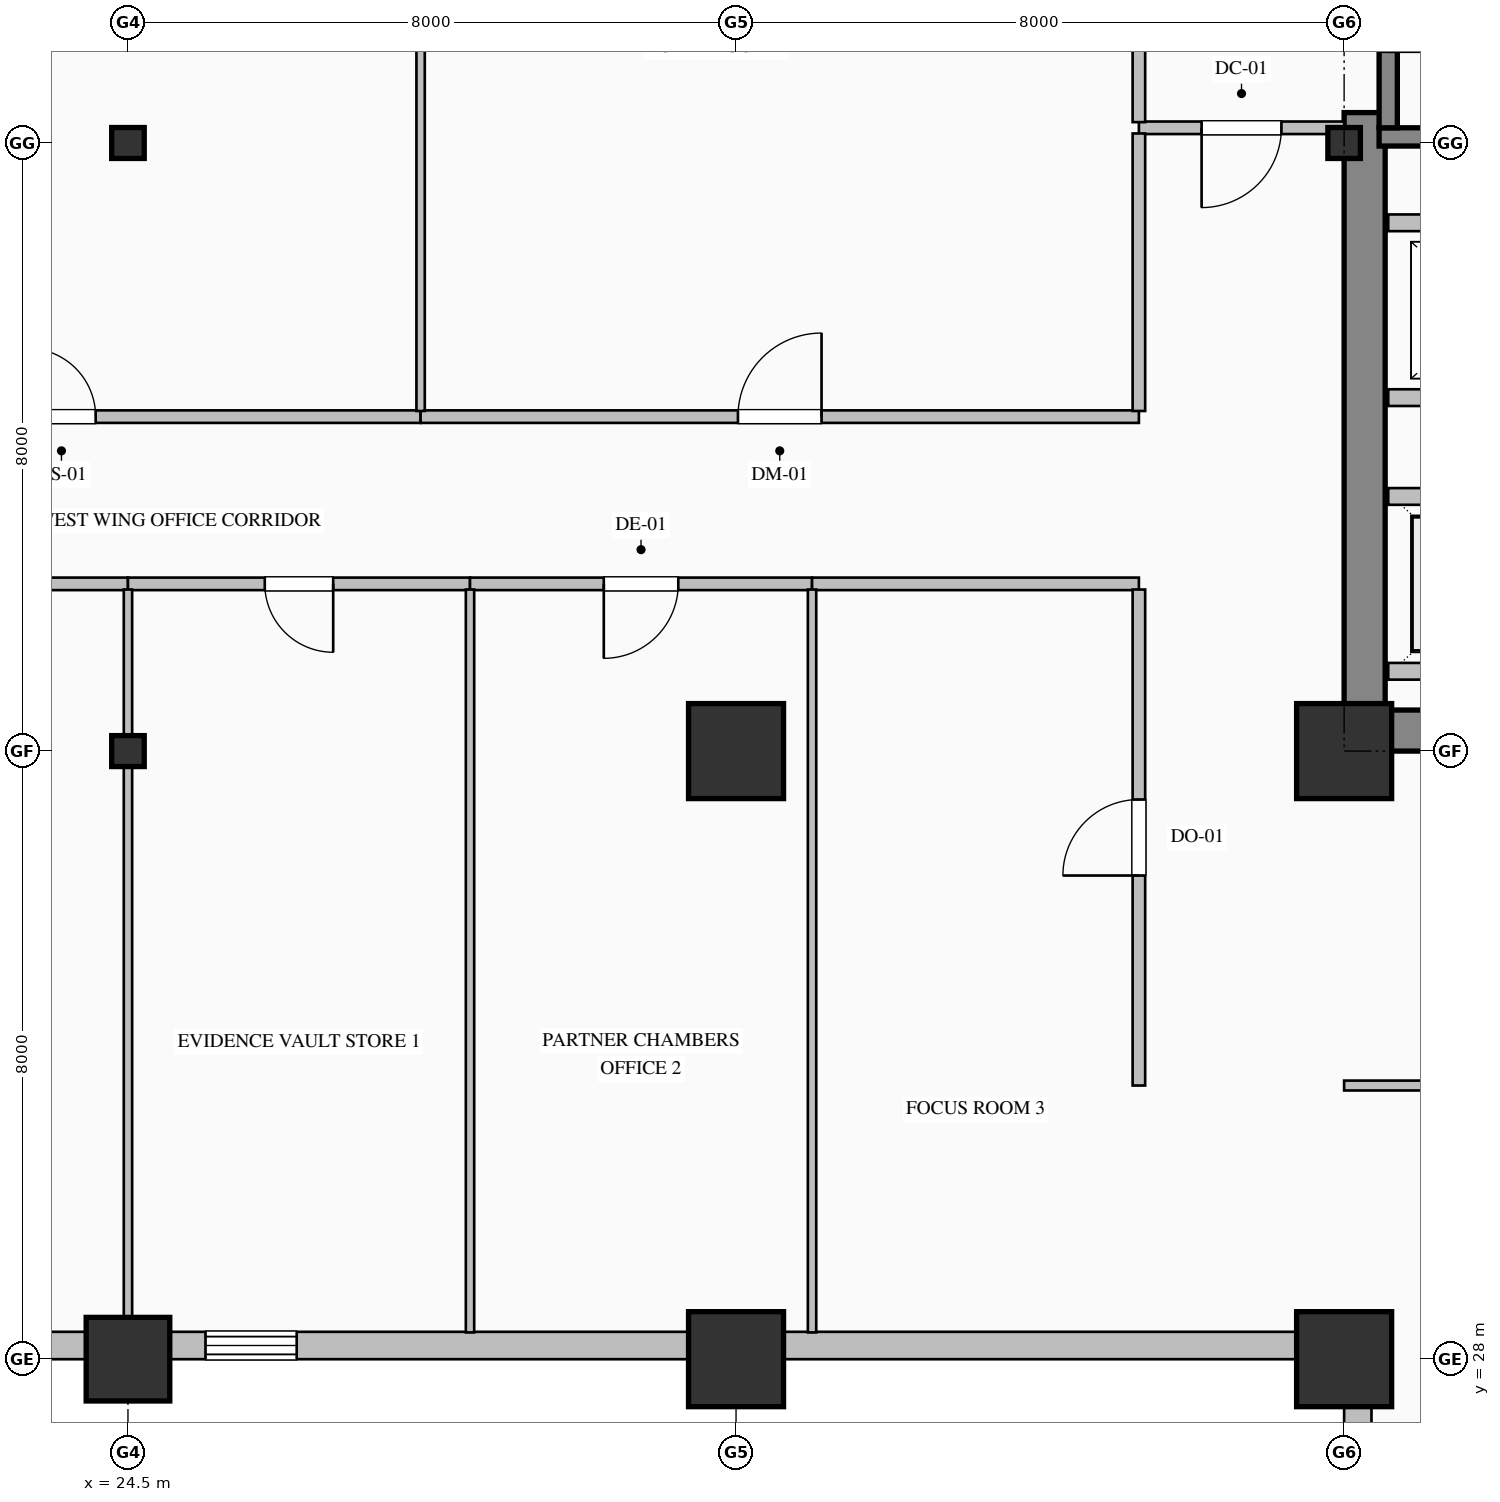
"""IFC4 building model, lengths in metres.
Left out: names, types, materials, properties, quantities, classifications, styles, units other than length and angle.
Written with IfcOpenShell. Run it as: python <this file> out.ifc"""

import sys

from ifc_helpers import new_model, si_unit, direction, frame, frame_2d, origin, origin_2d, place, context, subcontext, project, spatial, rectangle, hollow_rectangle, i_section, extrude, element, fill, save


model = new_model("IFC4")
c1 = context("Model", 3, precision=1e-05, world=origin(), true_north=direction((0.0, 1.0)))
c2 = subcontext(c1, "Body", "Model", "MODEL_VIEW")
j1 = project(units=[si_unit("LENGTHUNIT", "METRE"), si_unit("PLANEANGLEUNIT", "RADIAN")], contexts=[c1])
p1 = place(None, origin())
s1 = spatial("IfcSite", under=j1, at=p1, CompositionType="ELEMENT")
p2 = place(p1, origin())
s2 = spatial("IfcBuilding", under=s1, at=p2, CompositionType="ELEMENT")
p3 = place(p2, frame((0.0, 0.0, 104.2)))
s3 = spatial("IfcBuildingStorey", under=s2, at=p3, CompositionType="ELEMENT", Elevation=104.2)
p4 = place(p3, frame((40.77, 36.54, 0.0), z_axis=(0.0, 0.0, 1.0), x_axis=(0.0, 1.0, 0.0)))
e1 = element("IfcWall", 1, at=p4, inside=s3, PredefinedType="SHEAR", context=c2, shape_type="SweptSolid", body=[
    extrude(rectangle(XDim=7.86, YDim=0.54, at=frame_2d((3.93, 0.0))), origin(), (0.0, 0.0, 1.0), 3.65),
])
p5 = place(p3, frame((40.5, 36.27, 0.0), z_axis=(0.0, 0.0, 1.0), x_axis=(1.0, 0.0, 0.0)))
e2 = element("IfcWall", 2, at=p5, inside=s3, PredefinedType="SHEAR", context=c2, shape_type="SweptSolid", body=[
    extrude(rectangle(XDim=1.7, YDim=0.54, at=frame_2d((0.85, 0.0))), origin(), (0.0, 0.0, 1.0), 3.65),
])
p6 = place(p3, frame((24.5, 28.0, 0.0), z_axis=(0.0, 0.0, 1.0), x_axis=(1.0, 0.0, 0.0)))
e3 = element("IfcColumn", 3, at=p6, inside=s3, PredefinedType="COLUMN", context=c2, shape_type="SweptSolid", body=[
    extrude(hollow_rectangle(XDim=1.1, YDim=1.1, WallThickness=0.04, at=origin_2d()), origin(), (0.0, 0.0, 1.0), 4.0),
])
for number, where, z_axis, x_axis in (
    (4, (24.5, 36.0, 0.0), (0.0, 0.0, 1.0), (1.0, 0.0, 0.0)),
    (5, (24.5, 44.0, 0.0), (0.0, 0.0, 1.0), (1.0, 0.0, 0.0)),
):
    element("IfcColumn", number, at=place(p3, frame(where, z_axis=z_axis, x_axis=x_axis)), inside=s3, PredefinedType="COLUMN", context=c2, shape_type="SweptSolid", body=[
        extrude(i_section(OverallWidth=0.407, OverallDepth=0.428, WebThickness=0.02, FlangeThickness=0.035, FilletRadius=0.022, at=origin_2d()), origin(), (0.0, 0.0, 1.0), 4.0),
    ])
for number, where, z_axis, x_axis in (
    (6, (32.5, 28.0, 0.0), (0.0, 0.0, 1.0), (1.0, 0.0, 0.0)),
    (7, (32.5, 36.0, 0.0), (0.0, 0.0, 1.0), (1.0, 0.0, 0.0)),
    (8, (40.5, 28.0, 0.0), (0.0, 0.0, 1.0), (1.0, 0.0, 0.0)),
    (9, (40.5, 36.0, 0.0), (0.0, 0.0, 1.0), (1.0, 0.0, 0.0)),
):
    element("IfcColumn", number, at=place(p3, frame(where, z_axis=z_axis, x_axis=x_axis)), inside=s3, PredefinedType="COLUMN", context=c2, shape_type="SweptSolid", body=[
        extrude(hollow_rectangle(XDim=1.25, YDim=1.25, WallThickness=0.045, at=origin_2d()), origin(), (0.0, 0.0, 1.0), 4.0),
    ])
p7 = place(p3, frame((40.5, 44.0, 0.0), z_axis=(0.0, 0.0, 1.0), x_axis=(1.0, 0.0, 0.0)))
e10 = element("IfcColumn", 10, at=p7, inside=s3, PredefinedType="COLUMN", context=c2, shape_type="SweptSolid", body=[
    extrude(i_section(OverallWidth=0.407, OverallDepth=0.428, WebThickness=0.02, FlangeThickness=0.035, FilletRadius=0.022, at=origin_2d()), origin(), (0.0, 0.0, 1.0), 4.0),
])
p8 = place(p3, frame((40.68, 8.0, 0.0), z_axis=(0.0, 0.0, 1.0), x_axis=(0.0, 1.0, 0.0)))
e11 = element("IfcWall", 11, at=p8, inside=s3, PredefinedType="SOLIDWALL", context=c2, shape_type="SweptSolid", body=[
    extrude(rectangle(XDim=20.36, YDim=0.36, at=frame_2d((10.18, 0.0))), origin(), (0.0, 0.0, 1.0), 2.95),
])
p9 = place(p8, frame((6.6, 0.0, 0.7)))
e12 = element("IfcOpeningElement", 12, at=p9, cuts=e11, PredefinedType="OPENING", context=c2, shape_type="SweptSolid", body=[
    extrude(rectangle(XDim=1.2, YDim=1.85, at=frame_2d((0.6, 0.925))), frame((0.0, 0.19, 0.0), z_axis=(0.0, -1.0, 0.0), x_axis=(1.0, 0.0, 0.0)), (0.0, 0.0, 1.0), 0.38),
])
p10 = place(p8, frame((13.8, 0.0, 0.7)))
e13 = element("IfcOpeningElement", 13, at=p10, cuts=e11, PredefinedType="OPENING", context=c2, shape_type="SweptSolid", body=[
    extrude(rectangle(XDim=1.2, YDim=1.85, at=frame_2d((0.6, 0.925))), frame((0.0, 0.19, 0.0), z_axis=(0.0, -1.0, 0.0), x_axis=(1.0, 0.0, 0.0)), (0.0, 0.0, 1.0), 0.38),
])
p11 = place(p3, frame((40.52, 28.18, 0.0), z_axis=(0.0, 0.0, 1.0), x_axis=(-1.0, 0.0, 0.0)))
e14 = element("IfcWall", 14, at=p11, inside=s3, PredefinedType="SOLIDWALL", context=c2, shape_type="SweptSolid", body=[
    extrude(rectangle(XDim=36.52, YDim=0.36, at=frame_2d((18.26, 0.0))), origin(), (0.0, 0.0, 1.0), 2.95),
])
p12 = place(p11, frame((13.8, 0.0, 0.7)))
e15 = element("IfcOpeningElement", 15, at=p12, cuts=e14, PredefinedType="OPENING", context=c2, shape_type="SweptSolid", body=[
    extrude(rectangle(XDim=1.2, YDim=1.85, at=frame_2d((0.6, 0.925))), frame((0.0, 0.19, 0.0), z_axis=(0.0, -1.0, 0.0), x_axis=(1.0, 0.0, 0.0)), (0.0, 0.0, 1.0), 0.38),
])
p13 = place(p11, frame((17.4, 0.0, 0.7)))
e16 = element("IfcOpeningElement", 16, at=p13, cuts=e14, PredefinedType="OPENING", context=c2, shape_type="SweptSolid", body=[
    extrude(rectangle(XDim=1.2, YDim=1.85, at=frame_2d((0.6, 0.925))), frame((0.0, 0.19, 0.0), z_axis=(0.0, -1.0, 0.0), x_axis=(1.0, 0.0, 0.0)), (0.0, 0.0, 1.0), 0.38),
])
p14 = place(p11, frame((21.0, 0.0, 0.7)))
e17 = element("IfcOpeningElement", 17, at=p14, cuts=e14, PredefinedType="OPENING", context=c2, shape_type="SweptSolid", body=[
    extrude(rectangle(XDim=1.2, YDim=1.85, at=frame_2d((0.6, 0.925))), frame((0.0, 0.19, 0.0), z_axis=(0.0, -1.0, 0.0), x_axis=(1.0, 0.0, 0.0)), (0.0, 0.0, 1.0), 0.38),
])
p15 = place(p11, frame((28.2, 0.0, 0.7)))
e18 = element("IfcOpeningElement", 18, at=p15, cuts=e14, PredefinedType="OPENING", context=c2, shape_type="SweptSolid", body=[
    extrude(rectangle(XDim=1.2, YDim=1.85, at=frame_2d((0.6, 0.925))), frame((0.0, 0.19, 0.0), z_axis=(0.0, -1.0, 0.0), x_axis=(1.0, 0.0, 0.0)), (0.0, 0.0, 1.0), 0.38),
])
p16 = place(p3, frame((49.04, 44.08, 0.0), z_axis=(0.0, 0.0, 1.0), x_axis=(-1.0, 0.0, 0.0)))
e19 = element("IfcWall", 19, at=p16, inside=s3, PredefinedType="SOLIDWALL", context=c2, shape_type="SweptSolid", body=[
    extrude(rectangle(XDim=8.08, YDim=0.24, at=frame_2d((4.04, 0.0))), origin(), (0.0, 0.0, 1.0), 4.0),
])
p17 = place(p3, frame((41.08, 47.35, 0.0), z_axis=(0.0, 0.0, 1.0), x_axis=(0.0, -1.0, 0.0)))
e20 = element("IfcWall", 20, at=p17, inside=s3, PredefinedType="SOLIDWALL", context=c2, shape_type="SweptSolid", body=[
    extrude(rectangle(XDim=3.15, YDim=0.24, at=frame_2d((1.575, 0.0))), origin(), (0.0, 0.0, 1.0), 4.0),
])
p18 = place(p17, frame((1.0, 0.0, 0.0)))
e21 = element("IfcOpeningElement", 21, at=p18, cuts=e20, PredefinedType="OPENING", context=c2, shape_type="SweptSolid", body=[
    extrude(rectangle(XDim=1.15, YDim=2.2, at=frame_2d((0.575, 1.1))), frame((0.0, 0.13, 0.0), z_axis=(0.0, -1.0, 0.0), x_axis=(1.0, 0.0, 0.0)), (0.0, 0.0, 1.0), 0.26),
])
p19 = place(p3, frame((49.32, 37.05, 0.0), z_axis=(0.0, 0.0, 1.0), x_axis=(-1.0, 0.0, 0.0)))
e22 = element("IfcWall", 22, at=p19, inside=s3, PredefinedType="PARTITIONING", context=c2, shape_type="SweptSolid", body=[
    extrude(rectangle(XDim=8.24, YDim=0.22, at=frame_2d((4.12, 0.0))), origin(), (0.0, 0.0, 1.0), 3.65),
])
p20 = place(p19, frame((6.37, 0.0, 0.0)))
e23 = element("IfcOpeningElement", 23, at=p20, cuts=e22, PredefinedType="OPENING", context=c2, shape_type="SweptSolid", body=[
    extrude(rectangle(XDim=1.1, YDim=2.2, at=frame_2d((0.55, 1.1))), frame((0.0, 0.12, 0.0), z_axis=(0.0, -1.0, 0.0), x_axis=(1.0, 0.0, 0.0)), (0.0, 0.0, 1.0), 0.24),
])
p21 = place(p19, frame((3.57, 0.0, 0.0)))
e24 = element("IfcOpeningElement", 24, at=p21, cuts=e22, PredefinedType="OPENING", context=c2, shape_type="SweptSolid", body=[
    extrude(rectangle(XDim=1.1, YDim=2.2, at=frame_2d((0.55, 1.1))), frame((0.0, 0.12, 0.0), z_axis=(0.0, -1.0, 0.0), x_axis=(1.0, 0.0, 0.0)), (0.0, 0.0, 1.0), 0.24),
])
p22 = place(p19, frame((0.77, 0.0, 0.0)))
e25 = element("IfcOpeningElement", 25, at=p22, cuts=e22, PredefinedType="OPENING", context=c2, shape_type="SweptSolid", body=[
    extrude(rectangle(XDim=1.1, YDim=2.2, at=frame_2d((0.55, 1.1))), frame((0.0, 0.12, 0.0), z_axis=(0.0, -1.0, 0.0), x_axis=(1.0, 0.0, 0.0)), (0.0, 0.0, 1.0), 0.24),
])
for number, where, z_axis, x_axis in (
    (26, (41.08, 39.35, 0.0), (0.0, 0.0, 1.0), (1.0, 0.0, 0.0)),
    (27, (49.32, 40.65, 0.0), (0.0, 0.0, 1.0), (-1.0, 0.0, 0.0)),
    (28, (41.08, 42.95, 0.0), (0.0, 0.0, 1.0), (1.0, 0.0, 0.0)),
):
    element("IfcWall", number, at=place(p3, frame(where, z_axis=z_axis, x_axis=x_axis)), inside=s3, PredefinedType="PARTITIONING", context=c2, shape_type="SweptSolid", body=[
        extrude(rectangle(XDim=8.24, YDim=0.22, at=frame_2d((4.12, 0.0))), origin(), (0.0, 0.0, 1.0), 3.65),
    ])
p23 = place(p3, frame((40.5, 44.2, 0.0), z_axis=(0.0, 0.0, 1.0), x_axis=(-1.0, 0.0, 0.0)))
e29 = element("IfcWall", 29, at=p23, inside=s3, PredefinedType="PARTITIONING", context=c2, shape_type="SweptSolid", body=[
    extrude(rectangle(XDim=2.7, YDim=0.165, at=frame_2d((1.35, 0.0))), origin(), (0.0, 0.0, 1.0), 3.65),
])
p24 = place(p23, frame((0.825, 0.0, 0.0)))
e30 = element("IfcOpeningElement", 30, at=p24, cuts=e29, PredefinedType="OPENING", context=c2, shape_type="SweptSolid", body=[
    extrude(rectangle(XDim=1.05, YDim=2.15, at=frame_2d((0.525, 1.075))), frame((0.0, 0.093, 0.0), z_axis=(0.0, -1.0, 0.0), x_axis=(1.0, 0.0, 0.0)), (0.0, 0.0, 1.0), 0.185),
])
p25 = place(p3, frame((37.8, 44.274, 0.0), z_axis=(0.0, 0.0, 1.0), x_axis=(0.0, 1.0, 0.0)))
e31 = element("IfcWall", 31, at=p25, inside=s3, PredefinedType="PARTITIONING", context=c2, shape_type="SweptSolid", body=[
    extrude(rectangle(XDim=3.051, YDim=0.165, at=frame_2d((1.525, 0.0))), origin(), (0.0, 0.0, 1.0), 3.65),
])
p26 = place(p3, frame((18.9, 40.4, 0.0), z_axis=(0.0, 0.0, 1.0), x_axis=(1.0, 0.0, 0.0)))
e32 = element("IfcWall", 32, at=p26, inside=s3, PredefinedType="PARTITIONING", context=c2, shape_type="SweptSolid", body=[
    extrude(rectangle(XDim=9.45, YDim=0.165, at=frame_2d((4.725, 0.0))), origin(), (0.0, 0.0, 1.0), 3.65),
])
p27 = place(p26, frame((4.275, 0.0, 0.0)))
e33 = element("IfcOpeningElement", 33, at=p27, cuts=e32, PredefinedType="OPENING", context=c2, shape_type="SweptSolid", body=[
    extrude(rectangle(XDim=0.9, YDim=2.15, at=frame_2d((0.45, 1.075))), frame((0.0, 0.093, 0.0), z_axis=(0.0, -1.0, 0.0), x_axis=(1.0, 0.0, 0.0)), (0.0, 0.0, 1.0), 0.185),
])
p28 = place(p3, frame((28.35, 40.4, 0.0), z_axis=(0.0, 0.0, 1.0), x_axis=(1.0, 0.0, 0.0)))
e34 = element("IfcWall", 34, at=p28, inside=s3, PredefinedType="PARTITIONING", context=c2, shape_type="SweptSolid", body=[
    extrude(rectangle(XDim=9.45, YDim=0.165, at=frame_2d((4.725, 0.0))), origin(), (0.0, 0.0, 1.0), 3.65),
])
p29 = place(p28, frame((4.175, 0.0, 0.0)))
e35 = element("IfcOpeningElement", 35, at=p29, cuts=e34, PredefinedType="OPENING", context=c2, shape_type="SweptSolid", body=[
    extrude(rectangle(XDim=1.1, YDim=2.2, at=frame_2d((0.55, 1.1))), frame((0.0, 0.093, 0.0), z_axis=(0.0, -1.0, 0.0), x_axis=(1.0, 0.0, 0.0)), (0.0, 0.0, 1.0), 0.185),
])
p30 = place(p3, frame((24.5, 38.2, 0.0), z_axis=(0.0, 0.0, 1.0), x_axis=(-1.0, 0.0, 0.0)))
e36 = element("IfcWall", 36, at=p30, inside=s3, PredefinedType="PARTITIONING", context=c2, shape_type="SweptSolid", body=[
    extrude(rectangle(XDim=15.5, YDim=0.165, at=frame_2d((7.75, 0.0))), origin(), (0.0, 0.0, 1.0), 3.65),
])
p31 = place(p30, frame((6.75, 0.0, 0.0)))
e37 = element("IfcOpeningElement", 37, at=p31, cuts=e36, PredefinedType="OPENING", context=c2, shape_type="SweptSolid", body=[
    extrude(rectangle(XDim=2.0, YDim=2.4, at=frame_2d((1.0, 1.2))), frame((0.0, 0.093, 0.0), z_axis=(0.0, -1.0, 0.0), x_axis=(1.0, 0.0, 0.0)), (0.0, 0.0, 1.0), 0.185),
])
p32 = place(p3, frame((29.0, 38.2, 0.0), z_axis=(0.0, 0.0, 1.0), x_axis=(-1.0, 0.0, 0.0)))
e38 = element("IfcWall", 38, at=p32, inside=s3, PredefinedType="PARTITIONING", context=c2, shape_type="SweptSolid", body=[
    extrude(rectangle(XDim=4.5, YDim=0.165, at=frame_2d((2.25, 0.0))), origin(), (0.0, 0.0, 1.0), 3.65),
])
p33 = place(p32, frame((1.8, 0.0, 0.0)))
e39 = element("IfcOpeningElement", 39, at=p33, cuts=e38, PredefinedType="OPENING", context=c2, shape_type="SweptSolid", body=[
    extrude(rectangle(XDim=0.9, YDim=2.15, at=frame_2d((0.45, 1.075))), frame((0.0, 0.093, 0.0), z_axis=(0.0, -1.0, 0.0), x_axis=(1.0, 0.0, 0.0)), (0.0, 0.0, 1.0), 0.185),
])
p34 = place(p3, frame((33.5, 38.2, 0.0), z_axis=(0.0, 0.0, 1.0), x_axis=(-1.0, 0.0, 0.0)))
e40 = element("IfcWall", 40, at=p34, inside=s3, PredefinedType="PARTITIONING", context=c2, shape_type="SweptSolid", body=[
    extrude(rectangle(XDim=4.5, YDim=0.165, at=frame_2d((2.25, 0.0))), origin(), (0.0, 0.0, 1.0), 3.65),
])
p35 = place(p34, frame((1.76, 0.0, 0.0)))
e41 = element("IfcOpeningElement", 41, at=p35, cuts=e40, PredefinedType="OPENING", context=c2, shape_type="SweptSolid", body=[
    extrude(rectangle(XDim=0.98, YDim=2.25, at=frame_2d((0.49, 1.125))), frame((0.0, 0.093, 0.0), z_axis=(0.0, -1.0, 0.0), x_axis=(1.0, 0.0, 0.0)), (0.0, 0.0, 1.0), 0.185),
])
p36 = place(p3, frame((37.8, 38.2, 0.0), z_axis=(0.0, 0.0, 1.0), x_axis=(-1.0, 0.0, 0.0)))
e42 = element("IfcWall", 42, at=p36, inside=s3, PredefinedType="PARTITIONING", context=c2, shape_type="SweptSolid", body=[
    extrude(rectangle(XDim=4.3, YDim=0.165, at=frame_2d((2.15, 0.0))), origin(), (0.0, 0.0, 1.0), 3.65),
])
p37 = place(p3, frame((37.8, 40.475, 0.0), z_axis=(0.0, 0.0, 1.0), x_axis=(0.0, 1.0, 0.0)))
e43 = element("IfcWall", 43, at=p37, inside=s3, PredefinedType="PARTITIONING", context=c2, shape_type="SweptSolid", body=[
    extrude(rectangle(XDim=3.651, YDim=0.165, at=frame_2d((1.825, 0.0))), origin(), (0.0, 0.0, 1.0), 3.65),
])
p38 = place(p3, frame((37.8, 31.6, 0.0), z_axis=(0.0, 0.0, 1.0), x_axis=(0.0, 1.0, 0.0)))
e44 = element("IfcWall", 44, at=p38, inside=s3, PredefinedType="PARTITIONING", context=c2, shape_type="SweptSolid", body=[
    extrude(rectangle(XDim=6.525, YDim=0.165, at=frame_2d((3.263, 0.0))), origin(), (0.0, 0.0, 1.0), 3.65),
])
p39 = place(p38, frame((2.763, 0.0, 0.0)))
e45 = element("IfcOpeningElement", 45, at=p39, cuts=e44, PredefinedType="OPENING", context=c2, shape_type="SweptSolid", body=[
    extrude(rectangle(XDim=1.0, YDim=2.15, at=frame_2d((0.5, 1.075))), frame((0.0, 0.093, 0.0), z_axis=(0.0, -1.0, 0.0), x_axis=(1.0, 0.0, 0.0)), (0.0, 0.0, 1.0), 0.185),
])
p40 = place(p3, frame((43.0, 31.6, 0.0), z_axis=(0.0, 0.0, 1.0), x_axis=(-1.0, 0.0, 0.0)))
e46 = element("IfcWall", 46, at=p40, inside=s3, PredefinedType="PARTITIONING", context=c2, shape_type="SweptSolid", body=[
    extrude(rectangle(XDim=2.5, YDim=0.13, at=frame_2d((1.25, 0.0))), origin(), (0.0, 0.0, 1.0), 3.65),
])
p41 = place(p3, frame((28.35, 51.648, 0.0), z_axis=(0.0, 0.0, 1.0), x_axis=(0.0, -1.0, 0.0)))
e47 = element("IfcWall", 47, at=p41, inside=s3, PredefinedType="MOVABLE", context=c2, shape_type="SweptSolid", body=[
    extrude(rectangle(XDim=11.173, YDim=0.11, at=frame_2d((5.587, 0.0))), origin(), (0.0, 0.0, 1.0), 3.65),
])
p42 = place(p3, frame((24.5, 38.125, 0.0), z_axis=(0.0, 0.0, 1.0), x_axis=(0.0, -1.0, 0.0)))
e48 = element("IfcWall", 48, at=p42, inside=s3, PredefinedType="MOVABLE", context=c2, shape_type="SweptSolid", body=[
    extrude(rectangle(XDim=9.773, YDim=0.11, at=frame_2d((4.887, 0.0))), origin(), (0.0, 0.0, 1.0), 2.942),
])
for number, where, z_axis, x_axis in (
    (49, (29.0, 38.125, 0.0), (0.0, 0.0, 1.0), (0.0, -1.0, 0.0)),
    (50, (33.5, 38.125, 0.0), (0.0, 0.0, 1.0), (0.0, -1.0, 0.0)),
):
    element("IfcWall", number, at=place(p3, frame(where, z_axis=z_axis, x_axis=x_axis)), inside=s3, PredefinedType="MOVABLE", context=c2, shape_type="SweptSolid", body=[
        extrude(rectangle(XDim=9.773, YDim=0.11, at=frame_2d((4.887, 0.0))), origin(), (0.0, 0.0, 1.0), 3.65),
    ])
p43 = place(p12, origin())
e51 = element("IfcWindow", 51, at=p43, inside=s3, PartitioningType="DOUBLE_PANEL_VERTICAL", PredefinedType="WINDOW", context=c2, shape_type="SweptSolid", body=[
    extrude(rectangle(XDim=1.2, YDim=1.85, at=frame_2d((0.6, 0.925))), frame((0.0, 0.15, 0.0), z_axis=(0.0, -1.0, 0.0), x_axis=(1.0, 0.0, 0.0)), (0.0, 0.0, 1.0), 0.06),
])
fill(e15, e51)
p44 = place(p24, origin())
e52 = element("IfcDoor", 52, at=p44, inside=s3, OperationType="SINGLE_SWING_RIGHT", PredefinedType="DOOR", context=c2, shape_type="SweptSolid", body=[
    extrude(rectangle(XDim=1.05, YDim=2.15, at=frame_2d((0.525, 1.075))), frame((0.0, 0.025, 0.0), z_axis=(0.0, -1.0, 0.0), x_axis=(1.0, 0.0, 0.0)), (0.0, 0.0, 1.0), 0.05),
])
fill(e30, e52)
p45 = place(p27, origin())
e53 = element("IfcDoor", 53, at=p45, inside=s3, OperationType="SINGLE_SWING_LEFT", PredefinedType="DOOR", context=c2, shape_type="SweptSolid", body=[
    extrude(rectangle(XDim=0.9, YDim=2.15, at=frame_2d((0.45, 1.075))), frame((0.0, 0.025, 0.0), z_axis=(0.0, -1.0, 0.0), x_axis=(1.0, 0.0, 0.0)), (0.0, 0.0, 1.0), 0.05),
])
fill(e33, e53)
p46 = place(p29, origin())
e54 = element("IfcDoor", 54, at=p46, inside=s3, OperationType="SINGLE_SWING_RIGHT", PredefinedType="DOOR", context=c2, shape_type="SweptSolid", body=[
    extrude(rectangle(XDim=1.1, YDim=2.2, at=frame_2d((0.55, 1.1))), frame((0.0, 0.025, 0.0), z_axis=(0.0, -1.0, 0.0), x_axis=(1.0, 0.0, 0.0)), (0.0, 0.0, 1.0), 0.05),
])
fill(e35, e54)
p47 = place(p33, origin())
e55 = element("IfcDoor", 55, at=p47, inside=s3, OperationType="SINGLE_SWING_LEFT", PredefinedType="DOOR", context=c2, shape_type="SweptSolid", body=[
    extrude(rectangle(XDim=0.9, YDim=2.15, at=frame_2d((0.45, 1.075))), frame((0.0, 0.025, 0.0), z_axis=(0.0, -1.0, 0.0), x_axis=(1.0, 0.0, 0.0)), (0.0, 0.0, 1.0), 0.05),
])
fill(e39, e55)
p48 = place(p35, origin())
e56 = element("IfcDoor", 56, at=p48, inside=s3, OperationType="SINGLE_SWING_RIGHT", PredefinedType="DOOR", context=c2, shape_type="SweptSolid", body=[
    extrude(rectangle(XDim=0.98, YDim=2.25, at=frame_2d((0.49, 1.125))), frame((0.0, 0.025, 0.0), z_axis=(0.0, -1.0, 0.0), x_axis=(1.0, 0.0, 0.0)), (0.0, 0.0, 1.0), 0.05),
])
fill(e41, e56)
p49 = place(p39, origin())
e57 = element("IfcDoor", 57, at=p49, inside=s3, OperationType="SINGLE_SWING_LEFT", PredefinedType="DOOR", context=c2, shape_type="SweptSolid", body=[
    extrude(rectangle(XDim=1.0, YDim=2.15, at=frame_2d((0.5, 1.075))), frame((0.0, 0.025, 0.0), z_axis=(0.0, -1.0, 0.0), x_axis=(1.0, 0.0, 0.0)), (0.0, 0.0, 1.0), 0.05),
])
fill(e45, e57)
save(model, sys.argv[1])
